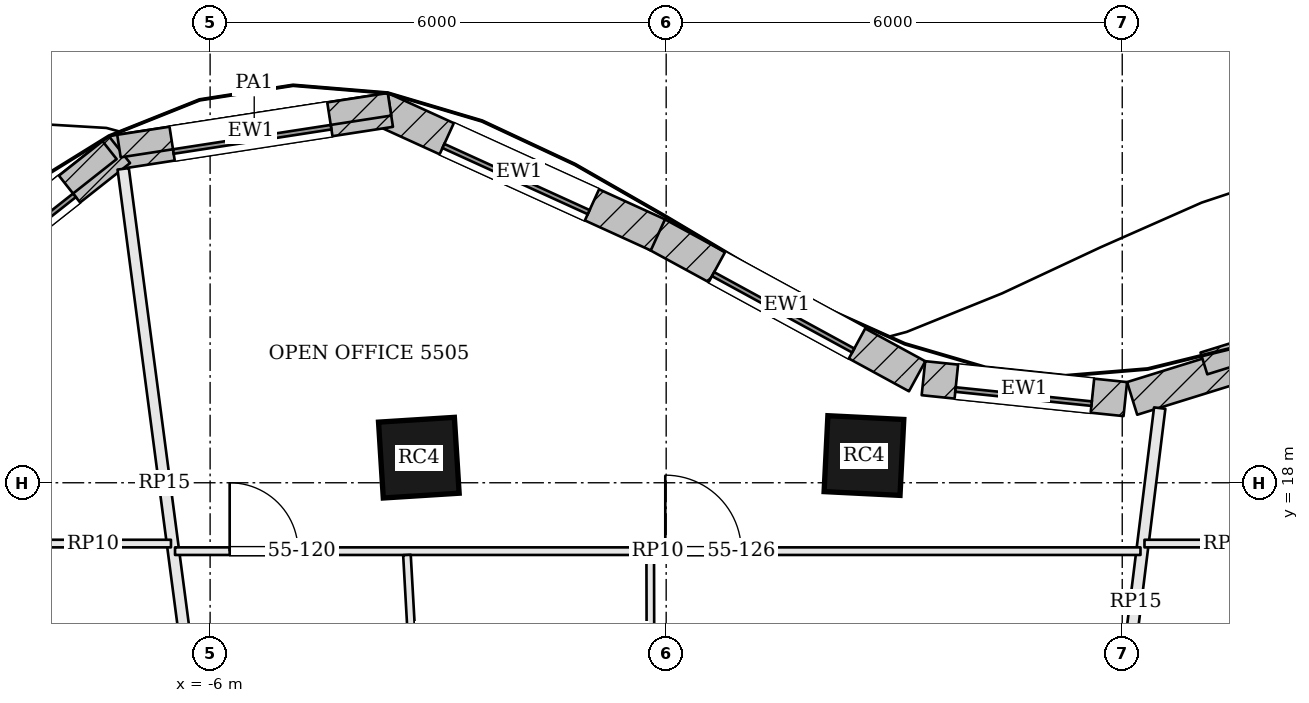
"""IFC4 building model, lengths in metres.
Left out: names, types, materials, properties, quantities, classifications, styles, units other than length and angle.
Written with IfcOpenShell. Run it as: python <this file> out.ifc"""

import sys

from ifc_helpers import new_model, si_unit, direction, frame, frame_2d, origin, origin_2d, place, context, subcontext, project, spatial, rectangle, extrude, element, fill, save


model = new_model("IFC4")
c1 = context("Model", 3, precision=1e-05, world=origin(), true_north=direction((0.0, 1.0)))
c2 = subcontext(c1, "Body", "Model", "MODEL_VIEW")
j1 = project(units=[si_unit("LENGTHUNIT", "METRE"), si_unit("PLANEANGLEUNIT", "RADIAN")], contexts=[c1])
p1 = place(None, origin())
s1 = spatial("IfcSite", under=j1, at=p1, CompositionType="ELEMENT")
p2 = place(p1, origin())
s2 = spatial("IfcBuilding", under=s1, at=p2, CompositionType="ELEMENT")
p3 = place(p2, frame((0.0, 0.0, 225.3)))
s3 = spatial("IfcBuildingStorey", under=s2, at=p3, CompositionType="ELEMENT", Elevation=225.3)
for number, where, z_axis, x_axis in (
    (1, (2.602, 18.358, 0.0), (0.0, 0.0, 1.0), (-0.999, 0.05, 0.0)),
    (2, (-3.254, 18.33, 0.0), (0.0, 0.0, 1.0), (-0.998, -0.063, 0.0)),
):
    element("IfcColumn", number, at=place(p3, frame(where, z_axis=z_axis, x_axis=x_axis)), inside=s3, PredefinedType="COLUMN", context=c2, shape_type="SweptSolid", body=[
        extrude(rectangle(XDim=1.0, YDim=1.0, at=origin_2d()), origin(), (0.0, 0.0, 1.0), 3.9),
    ])
p4 = place(p3, frame((11.007, 20.625, 0.0), z_axis=(0.0, 0.0, 1.0), x_axis=(-0.954949254112, -0.296769139352, 0.0)))
e3 = element("IfcWall", 3, at=p4, inside=s3, PredefinedType="SOLIDWALL", context=c2, shape_type="SweptSolid", body=[
    extrude(rectangle(XDim=5.106, YDim=0.45, at=frame_2d((2.553, 0.0))), origin(), (0.0, 0.0, 1.0), 3.7),
])
p5 = place(p4, frame((1.503, 0.0, 0.9)))
e4 = element("IfcOpeningElement", 4, at=p5, cuts=e3, PredefinedType="OPENING", context=c2, shape_type="SweptSolid", body=[
    extrude(rectangle(XDim=2.1, YDim=2.3, at=frame_2d((1.05, 1.15))), frame((0.0, 0.235, 0.0), z_axis=(0.0, -1.0, 0.0), x_axis=(1.0, 0.0, 0.0)), (0.0, 0.0, 1.0), 0.47),
])
p6 = place(p3, frame((6.04, 19.101, 0.0), z_axis=(0.0, 0.0, 1.0), x_axis=(-0.994675968472, 0.103052014752, 0.0)))
e5 = element("IfcWall", 5, at=p6, inside=s3, PredefinedType="SOLIDWALL", context=c2, shape_type="SweptSolid", body=[
    extrude(rectangle(XDim=2.67, YDim=0.45, at=frame_2d((1.335, 0.0))), origin(), (0.0, 0.0, 1.0), 3.7),
])
p7 = place(p6, frame((0.435, 0.0, 0.9)))
e6 = element("IfcOpeningElement", 6, at=p7, cuts=e5, PredefinedType="OPENING", context=c2, shape_type="SweptSolid", body=[
    extrude(rectangle(XDim=1.8, YDim=2.3, at=frame_2d((0.9, 1.15))), frame((0.0, 0.235, 0.0), z_axis=(0.0, -1.0, 0.0), x_axis=(1.0, 0.0, 0.0)), (0.0, 0.0, 1.0), 0.47),
])
p8 = place(p3, frame((3.302, 19.401, 0.0), z_axis=(0.0, 0.0, 1.0), x_axis=(-0.878060540763, 0.47854956562, 0.0)))
e7 = element("IfcWall", 7, at=p8, inside=s3, PredefinedType="SOLIDWALL", context=c2, shape_type="SweptSolid", body=[
    extrude(rectangle(XDim=3.901, YDim=0.45, at=frame_2d((1.951, 0.0))), origin(), (0.0, 0.0, 1.0), 3.7),
])
p9 = place(p8, frame((0.901, 0.0, 0.9)))
e8 = element("IfcOpeningElement", 8, at=p9, cuts=e7, PredefinedType="OPENING", context=c2, shape_type="SweptSolid", body=[
    extrude(rectangle(XDim=2.1, YDim=2.3, at=frame_2d((1.05, 1.15))), frame((0.0, 0.235, 0.0), z_axis=(0.0, -1.0, 0.0), x_axis=(1.0, 0.0, 0.0)), (0.0, 0.0, 1.0), 0.47),
])
p10 = place(p3, frame((-0.109, 21.261, 0.0), z_axis=(0.0, 0.0, 1.0), x_axis=(-0.910040573706, 0.414519184367, 0.0)))
e9 = element("IfcWall", 9, at=p10, inside=s3, PredefinedType="SOLIDWALL", context=c2, shape_type="SweptSolid", body=[
    extrude(rectangle(XDim=4.006, YDim=0.45, at=frame_2d((2.003, 0.0))), origin(), (0.0, 0.0, 1.0), 3.7),
])
p11 = place(p10, frame((0.953, 0.0, 0.9)))
e10 = element("IfcOpeningElement", 10, at=p11, cuts=e9, PredefinedType="OPENING", context=c2, shape_type="SweptSolid", body=[
    extrude(rectangle(XDim=2.1, YDim=2.3, at=frame_2d((1.05, 1.15))), frame((0.0, 0.235, 0.0), z_axis=(0.0, -1.0, 0.0), x_axis=(1.0, 0.0, 0.0)), (0.0, 0.0, 1.0), 0.47),
])
p12 = place(p3, frame((-3.629, 22.905, 0.0), z_axis=(0.0, 0.0, 1.0), x_axis=(-0.988300084321, -0.152521943772, 0.0)))
e11 = element("IfcWall", 11, at=p12, inside=s3, PredefinedType="SOLIDWALL", context=c2, shape_type="SweptSolid", body=[
    extrude(rectangle(XDim=3.71, YDim=0.45, at=frame_2d((1.855, 0.0))), origin(), (0.0, 0.0, 1.0), 3.7),
])
p13 = place(p12, frame((0.805, 0.0, 0.9)))
e12 = element("IfcOpeningElement", 12, at=p13, cuts=e11, PredefinedType="OPENING", context=c2, shape_type="SweptSolid", body=[
    extrude(rectangle(XDim=2.1, YDim=2.3, at=frame_2d((1.05, 1.15))), frame((0.0, 0.235, 0.0), z_axis=(0.0, -1.0, 0.0), x_axis=(1.0, 0.0, 0.0)), (0.0, 0.0, 1.0), 0.47),
])
p14 = place(p3, frame((-7.193, 22.383, 0.0), z_axis=(0.0, 0.0, 1.0), x_axis=(-0.784803291184, -0.619744942816, 0.0)))
e13 = element("IfcWall", 13, at=p14, inside=s3, PredefinedType="SOLIDWALL", context=c2, shape_type="SweptSolid", body=[
    extrude(rectangle(XDim=3.775, YDim=0.45, at=frame_2d((1.887, 0.0))), origin(), (0.0, 0.0, 1.0), 3.7),
])
p15 = place(p14, frame((0.837, 0.0, 0.9)))
e14 = element("IfcOpeningElement", 14, at=p15, cuts=e13, PredefinedType="OPENING", context=c2, shape_type="SweptSolid", body=[
    extrude(rectangle(XDim=2.1, YDim=2.3, at=frame_2d((1.05, 1.15))), frame((0.0, 0.235, 0.0), z_axis=(0.0, -1.0, 0.0), x_axis=(1.0, 0.0, 0.0)), (0.0, 0.0, 1.0), 0.47),
])
p16 = place(p3, frame((10.59, 20.662, 3.9), z_axis=(0.0, 0.0, 1.0), x_axis=(-0.954933257017, -0.296820610207, 0.0)))
e15 = element("IfcWall", 15, at=p16, inside=s3, PredefinedType="PARAPET", context=c2, shape_type="SweptSolid", body=[
    extrude(rectangle(XDim=3.681, YDim=0.3, at=frame_2d((1.84, 0.0))), origin(), (0.0, 0.0, 1.0), 1.1),
])
p17 = place(p3, frame((-3.64, 22.979, 3.9), z_axis=(0.0, 0.0, 1.0), x_axis=(-0.988299486994, -0.152525814235, 0.0)))
e16 = element("IfcWall", 16, at=p17, inside=s3, PredefinedType="PARAPET", context=c2, shape_type="SweptSolid", body=[
    extrude(rectangle(XDim=3.602, YDim=0.3, at=frame_2d((1.801, 0.0))), origin(), (0.0, 0.0, 1.0), 1.1),
])
p18 = place(p3, frame((-7.323, 22.376, 3.9), z_axis=(0.0, 0.0, 1.0), x_axis=(-0.784819122577, -0.61972489448, 0.0)))
e17 = element("IfcWall", 17, at=p18, inside=s3, PredefinedType="PARAPET", context=c2, shape_type="SweptSolid", body=[
    extrude(rectangle(XDim=3.633, YDim=0.3, at=frame_2d((1.817, 0.0))), origin(), (0.0, 0.0, 1.0), 1.1),
])
p19 = place(p3, frame((-7.144, 22.13, 0.0), z_axis=(0.0, 0.0, 1.0), x_axis=(0.130452237095, -0.991454594945, 0.0)))
e18 = element("IfcWall", 18, at=p19, inside=s3, PredefinedType="PARTITIONING", context=c2, shape_type="SweptSolid", body=[
    extrude(rectangle(XDim=8.326, YDim=0.15, at=frame_2d((4.163, 0.0))), origin(), (0.0, 0.0, 1.0), 3.184),
])
p20 = place(p3, frame((6.493, 18.982, 0.0), z_axis=(0.0, 0.0, 1.0), x_axis=(-0.122808633413, -0.992430370131, 0.0)))
e19 = element("IfcWall", 19, at=p20, inside=s3, PredefinedType="PARTITIONING", context=c2, shape_type="SweptSolid", body=[
    extrude(rectangle(XDim=5.147, YDim=0.15, at=frame_2d((2.573, 0.0))), origin(), (0.0, 0.0, 1.0), 3.184),
])
p21 = place(p3, frame((-8.566, 17.2, 0.0), z_axis=(0.0, 0.0, 1.0), x_axis=(1.0, 0.0, 0.0)))
e20 = element("IfcWall", 20, at=p21, inside=s3, PredefinedType="PARTITIONING", context=c2, shape_type="SweptSolid", body=[
    extrude(rectangle(XDim=2.051, YDim=0.1, at=frame_2d((1.025, 0.0))), origin(), (0.0, 0.0, 1.0), 3.084),
])
p22 = place(p3, frame((6.293, 17.2, 0.0), z_axis=(0.0, 0.0, 1.0), x_axis=(1.0, 0.0, 0.0)))
e21 = element("IfcWall", 21, at=p22, inside=s3, PredefinedType="PARTITIONING", context=c2, shape_type="SweptSolid", body=[
    extrude(rectangle(XDim=2.229, YDim=0.1, at=frame_2d((1.114, 0.0))), origin(), (0.0, 0.0, 1.0), 3.084),
])
p23 = place(p3, frame((-6.462, 17.1, 0.0), z_axis=(0.0, 0.0, 1.0), x_axis=(1.0, 0.0, 0.0)))
e22 = element("IfcWall", 22, at=p23, inside=s3, PredefinedType="PARTITIONING", context=c2, shape_type="SweptSolid", body=[
    extrude(rectangle(XDim=12.702, YDim=0.1, at=frame_2d((6.351, 0.0))), origin(), (0.0, 0.0, 1.0), 3.084),
])
p24 = place(p23, frame((0.719, 0.0, 0.0)))
e23 = element("IfcOpeningElement", 23, at=p24, cuts=e22, PredefinedType="OPENING", context=c2, shape_type="SweptSolid", body=[
    extrude(rectangle(XDim=0.9, YDim=2.1, at=frame_2d((0.45, 1.05))), frame((0.0, 0.06, 0.0), z_axis=(0.0, -1.0, 0.0), x_axis=(1.0, 0.0, 0.0)), (0.0, 0.0, 1.0), 0.12),
])
p25 = place(p23, frame((6.45, 0.0, 0.0)))
e24 = element("IfcOpeningElement", 24, at=p25, cuts=e22, PredefinedType="OPENING", context=c2, shape_type="SweptSolid", body=[
    extrude(rectangle(XDim=1.0, YDim=2.1, at=frame_2d((0.5, 1.05))), frame((0.0, 0.06, 0.0), z_axis=(0.0, -1.0, 0.0), x_axis=(1.0, 0.0, 0.0)), (0.0, 0.0, 1.0), 0.12),
])
p26 = place(p3, frame((-0.202, 13.875, 0.0), z_axis=(0.0, 0.0, 1.0), x_axis=(-0.002306798937, 0.999997339336, 0.0)))
e25 = element("IfcWall", 25, at=p26, inside=s3, PredefinedType="PARTITIONING", context=c2, shape_type="SweptSolid", body=[
    extrude(rectangle(XDim=3.175, YDim=0.1, at=frame_2d((1.587, 0.0))), origin(), (0.0, 0.0, 1.0), 3.084),
])
p27 = place(p3, frame((-3.231, 13.875, 0.0), z_axis=(0.0, 0.0, 1.0), x_axis=(-0.056350151772, 0.998411067845, 0.0)))
e26 = element("IfcWall", 26, at=p27, inside=s3, PredefinedType="PARTITIONING", context=c2, shape_type="SweptSolid", body=[
    extrude(rectangle(XDim=3.18, YDim=0.1, at=frame_2d((1.59, 0.0))), origin(), (0.0, 0.0, 1.0), 3.084),
])
p28 = place(p7, origin())
e27 = element("IfcWindow", 27, at=p28, inside=s3, PartitioningType="SINGLE_PANEL", PredefinedType="WINDOW", context=c2, shape_type="SweptSolid", body=[
    extrude(rectangle(XDim=1.8, YDim=2.3, at=frame_2d((0.9, 1.15))), frame((0.0, 0.135, 0.0), z_axis=(0.0, -1.0, 0.0), x_axis=(1.0, 0.0, 0.0)), (0.0, 0.0, 1.0), 0.06),
])
fill(e6, e27)
p29 = place(p9, origin())
e28 = element("IfcWindow", 28, at=p29, inside=s3, PartitioningType="SINGLE_PANEL", PredefinedType="WINDOW", context=c2, shape_type="SweptSolid", body=[
    extrude(rectangle(XDim=2.1, YDim=2.3, at=frame_2d((1.05, 1.15))), frame((0.0, 0.135, 0.0), z_axis=(0.0, -1.0, 0.0), x_axis=(1.0, 0.0, 0.0)), (0.0, 0.0, 1.0), 0.06),
])
fill(e8, e28)
p30 = place(p11, origin())
e29 = element("IfcWindow", 29, at=p30, inside=s3, PartitioningType="SINGLE_PANEL", PredefinedType="WINDOW", context=c2, shape_type="SweptSolid", body=[
    extrude(rectangle(XDim=2.1, YDim=2.3, at=frame_2d((1.05, 1.15))), frame((0.0, 0.135, 0.0), z_axis=(0.0, -1.0, 0.0), x_axis=(1.0, 0.0, 0.0)), (0.0, 0.0, 1.0), 0.06),
])
fill(e10, e29)
p31 = place(p13, origin())
e30 = element("IfcWindow", 30, at=p31, inside=s3, PartitioningType="SINGLE_PANEL", PredefinedType="WINDOW", context=c2, shape_type="SweptSolid", body=[
    extrude(rectangle(XDim=2.1, YDim=2.3, at=frame_2d((1.05, 1.15))), frame((0.0, 0.135, 0.0), z_axis=(0.0, -1.0, 0.0), x_axis=(1.0, 0.0, 0.0)), (0.0, 0.0, 1.0), 0.06),
])
fill(e12, e30)
p32 = place(p15, origin())
e31 = element("IfcWindow", 31, at=p32, inside=s3, PartitioningType="SINGLE_PANEL", PredefinedType="WINDOW", context=c2, shape_type="SweptSolid", body=[
    extrude(rectangle(XDim=2.1, YDim=2.3, at=frame_2d((1.05, 1.15))), frame((0.0, 0.135, 0.0), z_axis=(0.0, -1.0, 0.0), x_axis=(1.0, 0.0, 0.0)), (0.0, 0.0, 1.0), 0.06),
])
fill(e14, e31)
p33 = place(p24, origin())
e32 = element("IfcDoor", 32, at=p33, inside=s3, OperationType="SINGLE_SWING_LEFT", PredefinedType="DOOR", context=c2, shape_type="SweptSolid", body=[
    extrude(rectangle(XDim=0.9, YDim=2.1, at=frame_2d((0.45, 1.05))), frame((0.0, 0.025, 0.0), z_axis=(0.0, -1.0, 0.0), x_axis=(1.0, 0.0, 0.0)), (0.0, 0.0, 1.0), 0.05),
])
fill(e23, e32)
p34 = place(p25, origin())
e33 = element("IfcDoor", 33, at=p34, inside=s3, OperationType="SINGLE_SWING_LEFT", PredefinedType="DOOR", context=c2, shape_type="SweptSolid", body=[
    extrude(rectangle(XDim=1.0, YDim=2.1, at=frame_2d((0.5, 1.05))), frame((0.0, 0.025, 0.0), z_axis=(0.0, -1.0, 0.0), x_axis=(1.0, 0.0, 0.0)), (0.0, 0.0, 1.0), 0.05),
])
fill(e24, e33)
save(model, sys.argv[1])
